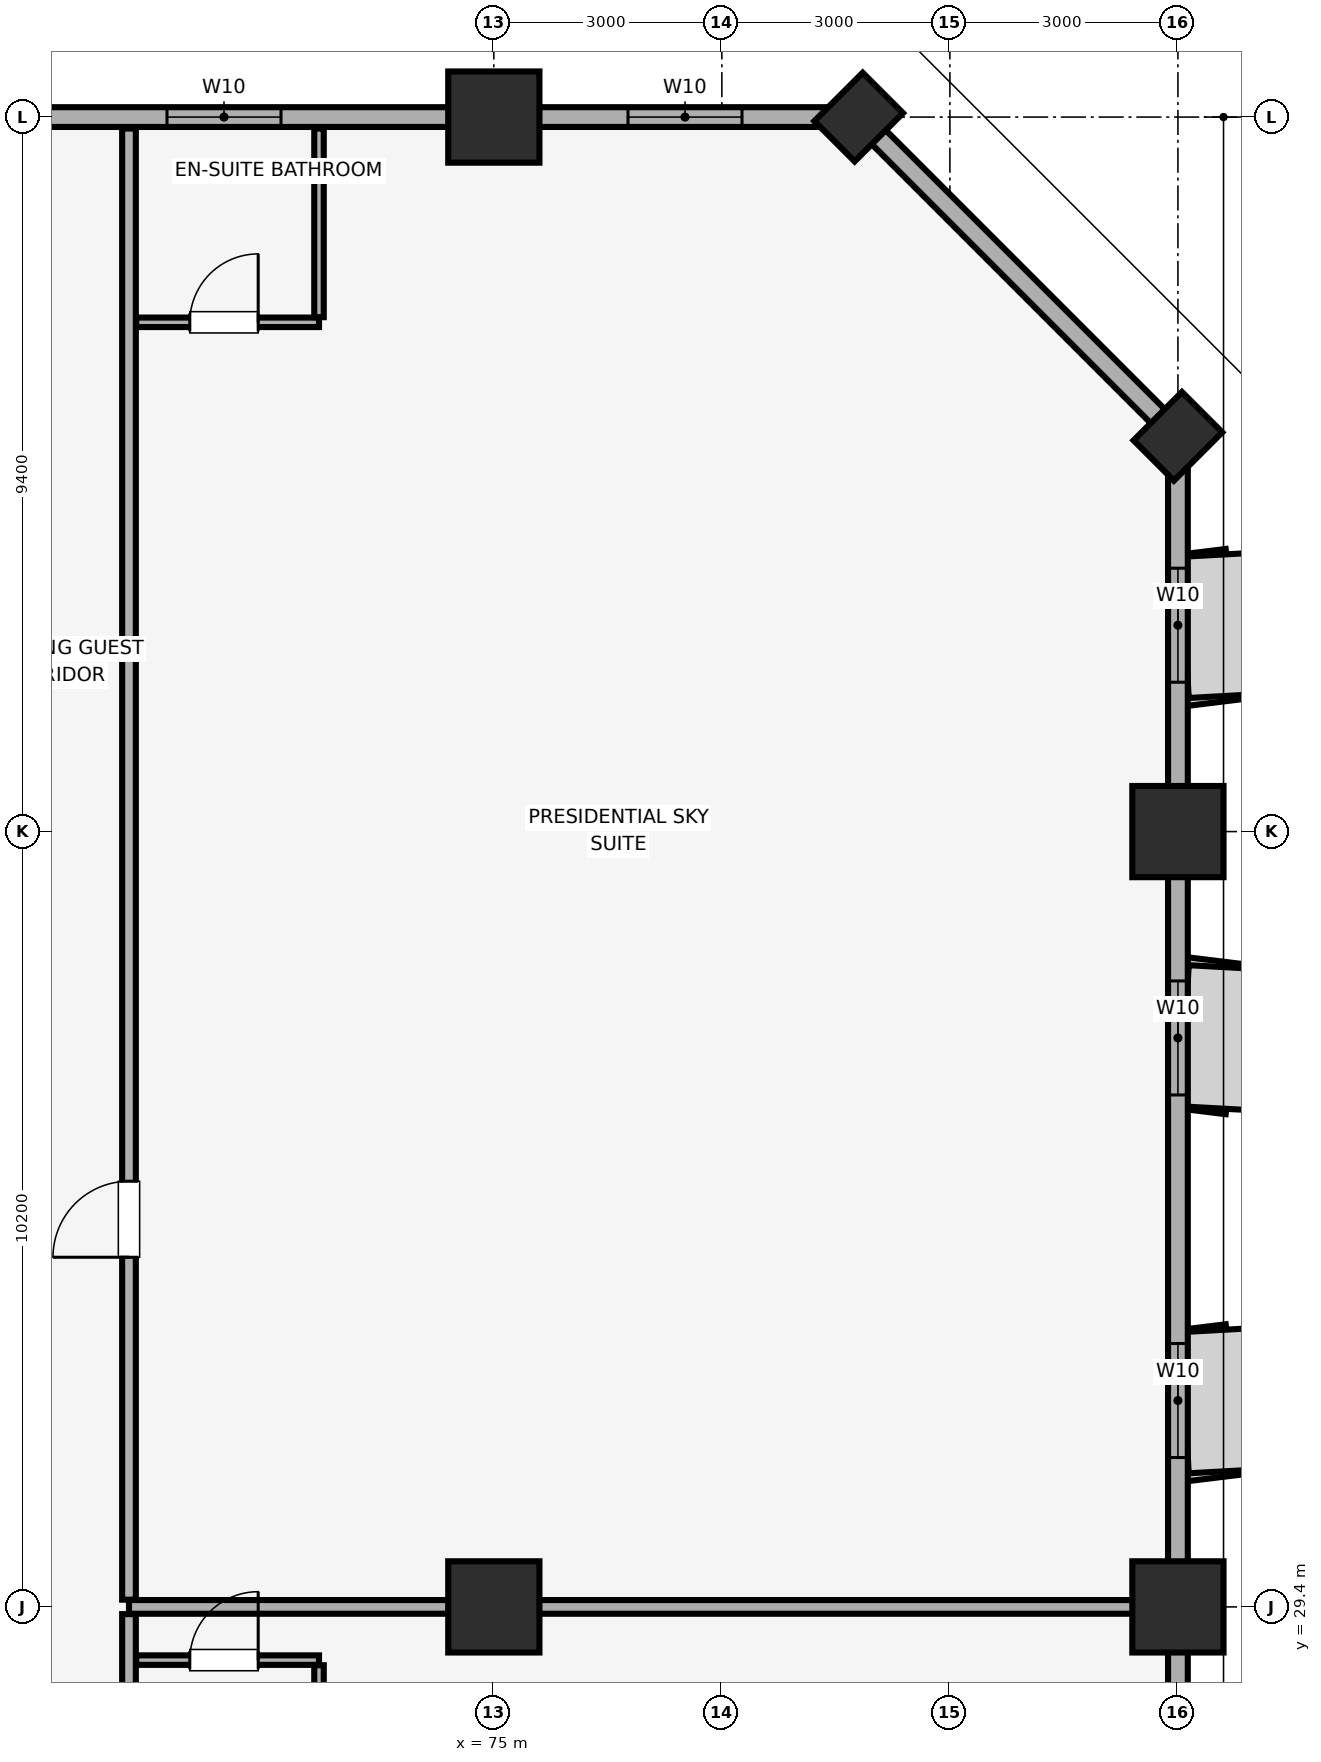
"""IFC4 building model, lengths in metres.
Left out: names, types, materials, properties, quantities, classifications, styles, units other than length and angle.
Written with IfcOpenShell. Run it as: python <this file> out.ifc"""

import sys

from ifc_helpers import new_model, si_unit, direction, frame, frame_2d, origin, origin_2d, place, context, subcontext, project, spatial, rectangle, extrude, element, fill, save


model = new_model("IFC4")
c1 = context("Model", 3, precision=1e-05, world=origin(), true_north=direction((0.0, 1.0)))
c2 = subcontext(c1, "Body", "Model", "MODEL_VIEW")
j1 = project(units=[si_unit("LENGTHUNIT", "METRE"), si_unit("PLANEANGLEUNIT", "RADIAN")], contexts=[c1])
p1 = place(None, origin())
s1 = spatial("IfcSite", under=j1, at=p1, CompositionType="ELEMENT")
p2 = place(p1, origin())
s2 = spatial("IfcBuilding", under=s1, at=p2, CompositionType="ELEMENT")
p3 = place(p2, frame((0.0, 0.0, 126.8)))
s3 = spatial("IfcBuildingStorey", under=s2, at=p3, CompositionType="ELEMENT", Elevation=126.8)
for number, where, z_axis, x_axis in (
    (1, (84.0, 29.4, 0.0), (0.0, 0.0, 1.0), (1.0, 0.0, 0.0)),
    (2, (84.0, 39.6, 0.0), (0.0, 0.0, 1.0), (1.0, 0.0, 0.0)),
):
    element("IfcColumn", number, at=place(p3, frame(where, z_axis=z_axis, x_axis=x_axis)), inside=s3, PredefinedType="COLUMN", context=c2, shape_type="SweptSolid", body=[
        extrude(rectangle(XDim=1.2, YDim=1.2, at=origin_2d()), origin(), (0.0, 0.0, 1.0), 3.51),
    ])
for number, where, z_axis, x_axis in (
    (3, (84.0, 44.8, 0.0), (0.0, 0.0, 1.0), (0.707, 0.707, 0.0)),
    (4, (79.8, 49.0, 0.0), (0.0, 0.0, 1.0), (0.707, 0.707, 0.0)),
):
    element("IfcColumn", number, at=place(p3, frame(where, z_axis=z_axis, x_axis=x_axis)), inside=s3, PredefinedType="PILASTER", context=c2, shape_type="SweptSolid", body=[
        extrude(rectangle(XDim=0.9, YDim=0.75, at=origin_2d()), origin(), (0.0, 0.0, 1.0), 3.51),
    ])
for number, where, z_axis, x_axis in (
    (5, (75.0, 29.4, 0.0), (0.0, 0.0, 1.0), (1.0, 0.0, 0.0)),
    (6, (75.0, 49.0, 0.0), (0.0, 0.0, 1.0), (1.0, 0.0, 0.0)),
):
    element("IfcColumn", number, at=place(p3, frame(where, z_axis=z_axis, x_axis=x_axis)), inside=s3, PredefinedType="COLUMN", context=c2, shape_type="SweptSolid", body=[
        extrude(rectangle(XDim=1.2, YDim=1.2, at=origin_2d()), origin(), (0.0, 0.0, 1.0), 3.51),
    ])
p4 = place(p3, frame((84.0, 4.2, 0.0), z_axis=(0.0, 0.0, 1.0), x_axis=(0.0, 1.0, 0.0)))
e7 = element("IfcWall", 7, at=p4, inside=s3, PredefinedType="SOLIDWALL", context=c2, shape_type="SweptSolid", body=[
    extrude(rectangle(XDim=40.6, YDim=0.26, at=frame_2d((20.3, 0.0))), origin(), (0.0, 0.0, 1.0), 2.56),
])
p5 = place(p4, frame((6.05, 0.0, 0.85)))
e8 = element("IfcOpeningElement", 8, at=p5, cuts=e7, PredefinedType="OPENING", context=c2, shape_type="SweptSolid", body=[
    extrude(rectangle(XDim=1.5, YDim=1.4, at=frame_2d((0.75, 0.7))), frame((0.0, 0.14, 0.0), z_axis=(0.0, -1.0, 0.0), x_axis=(1.0, 0.0, 0.0)), (0.0, 0.0, 1.0), 0.28),
])
p6 = place(p4, frame((12.765, 0.0, 0.85)))
e9 = element("IfcOpeningElement", 9, at=p6, cuts=e7, PredefinedType="OPENING", context=c2, shape_type="SweptSolid", body=[
    extrude(rectangle(XDim=1.5, YDim=1.4, at=frame_2d((0.75, 0.7))), frame((0.0, 0.14, 0.0), z_axis=(0.0, -1.0, 0.0), x_axis=(1.0, 0.0, 0.0)), (0.0, 0.0, 1.0), 0.28),
])
p7 = place(p4, frame((17.535, 0.0, 0.85)))
e10 = element("IfcOpeningElement", 10, at=p7, cuts=e7, PredefinedType="OPENING", context=c2, shape_type="SweptSolid", body=[
    extrude(rectangle(XDim=1.5, YDim=1.4, at=frame_2d((0.75, 0.7))), frame((0.0, 0.14, 0.0), z_axis=(0.0, -1.0, 0.0), x_axis=(1.0, 0.0, 0.0)), (0.0, 0.0, 1.0), 0.28),
])
p8 = place(p4, frame((27.165, 0.0, 0.85)))
e11 = element("IfcOpeningElement", 11, at=p8, cuts=e7, PredefinedType="OPENING", context=c2, shape_type="SweptSolid", body=[
    extrude(rectangle(XDim=1.5, YDim=1.4, at=frame_2d((0.75, 0.7))), frame((0.0, 0.14, 0.0), z_axis=(0.0, -1.0, 0.0), x_axis=(1.0, 0.0, 0.0)), (0.0, 0.0, 1.0), 0.28),
])
p9 = place(p4, frame((31.935, 0.0, 0.85)))
e12 = element("IfcOpeningElement", 12, at=p9, cuts=e7, PredefinedType="OPENING", context=c2, shape_type="SweptSolid", body=[
    extrude(rectangle(XDim=1.5, YDim=1.4, at=frame_2d((0.75, 0.7))), frame((0.0, 0.14, 0.0), z_axis=(0.0, -1.0, 0.0), x_axis=(1.0, 0.0, 0.0)), (0.0, 0.0, 1.0), 0.28),
])
p10 = place(p4, frame((37.365, 0.0, 0.85)))
e13 = element("IfcOpeningElement", 13, at=p10, cuts=e7, PredefinedType="OPENING", context=c2, shape_type="SweptSolid", body=[
    extrude(rectangle(XDim=1.5, YDim=1.4, at=frame_2d((0.75, 0.7))), frame((0.0, 0.14, 0.0), z_axis=(0.0, -1.0, 0.0), x_axis=(1.0, 0.0, 0.0)), (0.0, 0.0, 1.0), 0.28),
])
p11 = place(p3, frame((84.0, 44.8, 0.0), z_axis=(0.0, 0.0, 1.0), x_axis=(-0.707106781187, 0.707106781187, 0.0)))
e14 = element("IfcWall", 14, at=p11, inside=s3, PredefinedType="SOLIDWALL", context=c2, shape_type="SweptSolid", body=[
    extrude(rectangle(XDim=5.94, YDim=0.26, at=frame_2d((2.97, 0.0))), origin(), (0.0, 0.0, 1.0), 2.56),
])
p12 = place(p3, frame((79.8, 49.0, 0.0), z_axis=(0.0, 0.0, 1.0), x_axis=(-1.0, 0.0, 0.0)))
e15 = element("IfcWall", 15, at=p12, inside=s3, PredefinedType="SOLIDWALL", context=c2, shape_type="SweptSolid", body=[
    extrude(rectangle(XDim=75.6, YDim=0.26, at=frame_2d((37.8, 0.0))), origin(), (0.0, 0.0, 1.0), 2.56),
])
p13 = place(p12, frame((72.565, 0.0, 0.85)))
e16 = element("IfcOpeningElement", 16, at=p13, cuts=e15, PredefinedType="OPENING", context=c2, shape_type="SweptSolid", body=[
    extrude(rectangle(XDim=1.5, YDim=1.4, at=frame_2d((0.75, 0.7))), frame((0.0, 0.14, 0.0), z_axis=(0.0, -1.0, 0.0), x_axis=(1.0, 0.0, 0.0)), (0.0, 0.0, 1.0), 0.28),
])
p14 = place(p12, frame((67.45, 0.0, 0.85)))
e17 = element("IfcOpeningElement", 17, at=p14, cuts=e15, PredefinedType="OPENING", context=c2, shape_type="SweptSolid", body=[
    extrude(rectangle(XDim=1.5, YDim=1.4, at=frame_2d((0.75, 0.7))), frame((0.0, 0.14, 0.0), z_axis=(0.0, -1.0, 0.0), x_axis=(1.0, 0.0, 0.0)), (0.0, 0.0, 1.0), 0.28),
])
p15 = place(p12, frame((7.6, 0.0, 0.85)))
e18 = element("IfcOpeningElement", 18, at=p15, cuts=e15, PredefinedType="OPENING", context=c2, shape_type="SweptSolid", body=[
    extrude(rectangle(XDim=1.5, YDim=1.4, at=frame_2d((0.75, 0.7))), frame((0.0, 0.14, 0.0), z_axis=(0.0, -1.0, 0.0), x_axis=(1.0, 0.0, 0.0)), (0.0, 0.0, 1.0), 0.28),
])
p16 = place(p12, frame((1.535, 0.0, 0.85)))
e19 = element("IfcOpeningElement", 19, at=p16, cuts=e15, PredefinedType="OPENING", context=c2, shape_type="SweptSolid", body=[
    extrude(rectangle(XDim=1.5, YDim=1.4, at=frame_2d((0.75, 0.7))), frame((0.0, 0.14, 0.0), z_axis=(0.0, -1.0, 0.0), x_axis=(1.0, 0.0, 0.0)), (0.0, 0.0, 1.0), 0.28),
])
p17 = place(p12, frame((52.265, 0.0, 0.9)))
e20 = element("IfcOpeningElement", 20, at=p17, cuts=e15, PredefinedType="OPENING", context=c2, shape_type="SweptSolid", body=[
    extrude(rectangle(XDim=1.5, YDim=1.4, at=frame_2d((0.75, 0.7))), frame((0.0, 0.14, 0.0), z_axis=(0.0, -1.0, 0.0), x_axis=(1.0, 0.0, 0.0)), (0.0, 0.0, 1.0), 0.28),
])
p18 = place(p12, frame((45.5, 0.0, 0.9)))
e21 = element("IfcOpeningElement", 21, at=p18, cuts=e15, PredefinedType="OPENING", context=c2, shape_type="SweptSolid", body=[
    extrude(rectangle(XDim=1.5, YDim=1.4, at=frame_2d((0.75, 0.7))), frame((0.0, 0.14, 0.0), z_axis=(0.0, -1.0, 0.0), x_axis=(1.0, 0.0, 0.0)), (0.0, 0.0, 1.0), 0.28),
])
p19 = place(p12, frame((31.05, 0.0, 0.9)))
e22 = element("IfcOpeningElement", 22, at=p19, cuts=e15, PredefinedType="OPENING", context=c2, shape_type="SweptSolid", body=[
    extrude(rectangle(XDim=1.5, YDim=1.4, at=frame_2d((0.75, 0.7))), frame((0.0, 0.14, 0.0), z_axis=(0.0, -1.0, 0.0), x_axis=(1.0, 0.0, 0.0)), (0.0, 0.0, 1.0), 0.28),
])
p20 = place(p12, frame((27.85, 0.0, 0.9)))
e23 = element("IfcOpeningElement", 23, at=p20, cuts=e15, PredefinedType="OPENING", context=c2, shape_type="SweptSolid", body=[
    extrude(rectangle(XDim=1.5, YDim=1.4, at=frame_2d((0.75, 0.7))), frame((0.0, 0.14, 0.0), z_axis=(0.0, -1.0, 0.0), x_axis=(1.0, 0.0, 0.0)), (0.0, 0.0, 1.0), 0.28),
])
p21 = place(p12, frame((23.485, 0.0, 0.9)))
e24 = element("IfcOpeningElement", 24, at=p21, cuts=e15, PredefinedType="OPENING", context=c2, shape_type="SweptSolid", body=[
    extrude(rectangle(XDim=1.5, YDim=1.4, at=frame_2d((0.75, 0.7))), frame((0.0, 0.14, 0.0), z_axis=(0.0, -1.0, 0.0), x_axis=(1.0, 0.0, 0.0)), (0.0, 0.0, 1.0), 0.28),
])
p22 = place(p3, frame((70.2, 29.4, 0.0), z_axis=(0.0, 0.0, 1.0), x_axis=(1.0, 0.0, 0.0)))
e25 = element("IfcWall", 25, at=p22, inside=s3, PredefinedType="PARTITIONING", context=c2, shape_type="SweptSolid", body=[
    extrude(rectangle(XDim=13.65, YDim=0.18, at=frame_2d((6.825, 0.0))), origin(), (0.0, 0.0, 1.0), 2.669),
])
p23 = place(p3, frame((70.2, 26.745, 0.0), z_axis=(0.0, 0.0, 1.0), x_axis=(0.0, 1.0, 0.0)))
e26 = element("IfcWall", 26, at=p23, inside=s3, PredefinedType="PARTITIONING", context=c2, shape_type="SweptSolid", body=[
    extrude(rectangle(XDim=2.56, YDim=0.18, at=frame_2d((1.28, 0.0))), origin(), (0.0, 0.0, 1.0), 3.51),
])
p24 = place(p3, frame((70.295, 28.7, 0.0), z_axis=(0.0, 0.0, 1.0), x_axis=(1.0, 0.0, 0.0)))
e27 = element("IfcWall", 27, at=p24, inside=s3, PredefinedType="PARTITIONING", context=c2, shape_type="SweptSolid", body=[
    extrude(rectangle(XDim=2.405, YDim=0.125, at=frame_2d((1.203, 0.0))), origin(), (0.0, 0.0, 1.0), 3.51),
])
p25 = place(p24, frame((0.705, 0.0, 0.0)))
e28 = element("IfcOpeningElement", 28, at=p25, cuts=e27, PredefinedType="OPENING", context=c2, shape_type="SweptSolid", body=[
    extrude(rectangle(XDim=0.9, YDim=2.1, at=frame_2d((0.45, 1.05))), frame((0.0, 0.073, 0.0), z_axis=(0.0, -1.0, 0.0), x_axis=(1.0, 0.0, 0.0)), (0.0, 0.0, 1.0), 0.145),
])
p26 = place(p3, frame((72.7, 26.745, 0.0), z_axis=(0.0, 0.0, 1.0), x_axis=(0.0, 1.0, 0.0)))
e29 = element("IfcWall", 29, at=p26, inside=s3, PredefinedType="PARTITIONING", context=c2, shape_type="SweptSolid", body=[
    extrude(rectangle(XDim=1.887, YDim=0.125, at=frame_2d((0.944, 0.0))), origin(), (0.0, 0.0, 1.0), 3.51),
])
p27 = place(p3, frame((70.2, 29.495, 0.0), z_axis=(0.0, 0.0, 1.0), x_axis=(0.0, 1.0, 0.0)))
e30 = element("IfcWall", 30, at=p27, inside=s3, PredefinedType="PARTITIONING", context=c2, shape_type="SweptSolid", body=[
    extrude(rectangle(XDim=19.355, YDim=0.18, at=frame_2d((9.677, 0.0))), origin(), (0.0, 0.0, 1.0), 3.51),
])
p28 = place(p27, frame((4.505, 0.0, 0.0)))
e31 = element("IfcOpeningElement", 31, at=p28, cuts=e30, PredefinedType="OPENING", context=c2, shape_type="SweptSolid", body=[
    extrude(rectangle(XDim=1.0, YDim=2.15, at=frame_2d((0.5, 1.075))), frame((0.0, 0.1, 0.0), z_axis=(0.0, -1.0, 0.0), x_axis=(1.0, 0.0, 0.0)), (0.0, 0.0, 1.0), 0.2),
])
p29 = place(p3, frame((70.295, 46.3, 0.0), z_axis=(0.0, 0.0, 1.0), x_axis=(1.0, 0.0, 0.0)))
e32 = element("IfcWall", 32, at=p29, inside=s3, PredefinedType="PARTITIONING", context=c2, shape_type="SweptSolid", body=[
    extrude(rectangle(XDim=2.405, YDim=0.125, at=frame_2d((1.203, 0.0))), origin(), (0.0, 0.0, 1.0), 3.51),
])
p30 = place(p29, frame((0.705, 0.0, 0.0)))
e33 = element("IfcOpeningElement", 33, at=p30, cuts=e32, PredefinedType="OPENING", context=c2, shape_type="SweptSolid", body=[
    extrude(rectangle(XDim=0.9, YDim=2.1, at=frame_2d((0.45, 1.05))), frame((0.0, 0.073, 0.0), z_axis=(0.0, -1.0, 0.0), x_axis=(1.0, 0.0, 0.0)), (0.0, 0.0, 1.0), 0.145),
])
p31 = place(p3, frame((72.7, 46.367, 0.0), z_axis=(0.0, 0.0, 1.0), x_axis=(0.0, 1.0, 0.0)))
e34 = element("IfcWall", 34, at=p31, inside=s3, PredefinedType="PARTITIONING", context=c2, shape_type="SweptSolid", body=[
    extrude(rectangle(XDim=2.483, YDim=0.125, at=frame_2d((1.241, 0.0))), origin(), (0.0, 0.0, 1.0), 3.51),
])
p32 = place(p8, origin())
e35 = element("IfcWindow", 35, at=p32, inside=s3, PartitioningType="SINGLE_PANEL", PredefinedType="WINDOW", context=c2, shape_type="SweptSolid", body=[
    extrude(rectangle(XDim=1.5, YDim=1.4, at=frame_2d((0.75, 0.7))), frame((0.0, 0.03, 0.0), z_axis=(0.0, -1.0, 0.0), x_axis=(1.0, 0.0, 0.0)), (0.0, 0.0, 1.0), 0.06),
])
fill(e11, e35)
p33 = place(p9, origin())
e36 = element("IfcWindow", 36, at=p33, inside=s3, PartitioningType="SINGLE_PANEL", PredefinedType="WINDOW", context=c2, shape_type="SweptSolid", body=[
    extrude(rectangle(XDim=1.5, YDim=1.4, at=frame_2d((0.75, 0.7))), frame((0.0, 0.03, 0.0), z_axis=(0.0, -1.0, 0.0), x_axis=(1.0, 0.0, 0.0)), (0.0, 0.0, 1.0), 0.06),
])
fill(e12, e36)
p34 = place(p10, origin())
e37 = element("IfcWindow", 37, at=p34, inside=s3, PartitioningType="SINGLE_PANEL", PredefinedType="WINDOW", context=c2, shape_type="SweptSolid", body=[
    extrude(rectangle(XDim=1.5, YDim=1.4, at=frame_2d((0.75, 0.7))), frame((0.0, 0.03, 0.0), z_axis=(0.0, -1.0, 0.0), x_axis=(1.0, 0.0, 0.0)), (0.0, 0.0, 1.0), 0.06),
])
fill(e13, e37)
p35 = place(p15, origin())
e38 = element("IfcWindow", 38, at=p35, inside=s3, PartitioningType="SINGLE_PANEL", PredefinedType="WINDOW", context=c2, shape_type="SweptSolid", body=[
    extrude(rectangle(XDim=1.5, YDim=1.4, at=frame_2d((0.75, 0.7))), frame((0.0, 0.03, 0.0), z_axis=(0.0, -1.0, 0.0), x_axis=(1.0, 0.0, 0.0)), (0.0, 0.0, 1.0), 0.06),
])
fill(e18, e38)
p36 = place(p16, origin())
e39 = element("IfcWindow", 39, at=p36, inside=s3, PartitioningType="SINGLE_PANEL", PredefinedType="WINDOW", context=c2, shape_type="SweptSolid", body=[
    extrude(rectangle(XDim=1.5, YDim=1.4, at=frame_2d((0.75, 0.7))), frame((0.0, 0.03, 0.0), z_axis=(0.0, -1.0, 0.0), x_axis=(1.0, 0.0, 0.0)), (0.0, 0.0, 1.0), 0.06),
])
fill(e19, e39)
p37 = place(p25, origin())
e40 = element("IfcDoor", 40, at=p37, inside=s3, OperationType="SINGLE_SWING_RIGHT", PredefinedType="DOOR", context=c2, shape_type="SweptSolid", body=[
    extrude(rectangle(XDim=0.9, YDim=2.1, at=frame_2d((0.45, 1.05))), frame((0.0, 0.025, 0.0), z_axis=(0.0, -1.0, 0.0), x_axis=(1.0, 0.0, 0.0)), (0.0, 0.0, 1.0), 0.05),
])
fill(e28, e40)
p38 = place(p28, origin())
e41 = element("IfcDoor", 41, at=p38, inside=s3, OperationType="SINGLE_SWING_LEFT", PredefinedType="DOOR", context=c2, shape_type="SweptSolid", body=[
    extrude(rectangle(XDim=1.0, YDim=2.15, at=frame_2d((0.5, 1.075))), frame((0.0, 0.025, 0.0), z_axis=(0.0, -1.0, 0.0), x_axis=(1.0, 0.0, 0.0)), (0.0, 0.0, 1.0), 0.05),
])
fill(e31, e41)
p39 = place(p30, origin())
e42 = element("IfcDoor", 42, at=p39, inside=s3, OperationType="SINGLE_SWING_RIGHT", PredefinedType="DOOR", context=c2, shape_type="SweptSolid", body=[
    extrude(rectangle(XDim=0.9, YDim=2.1, at=frame_2d((0.45, 1.05))), frame((0.0, 0.025, 0.0), z_axis=(0.0, -1.0, 0.0), x_axis=(1.0, 0.0, 0.0)), (0.0, 0.0, 1.0), 0.05),
])
fill(e33, e42)
save(model, sys.argv[1])
